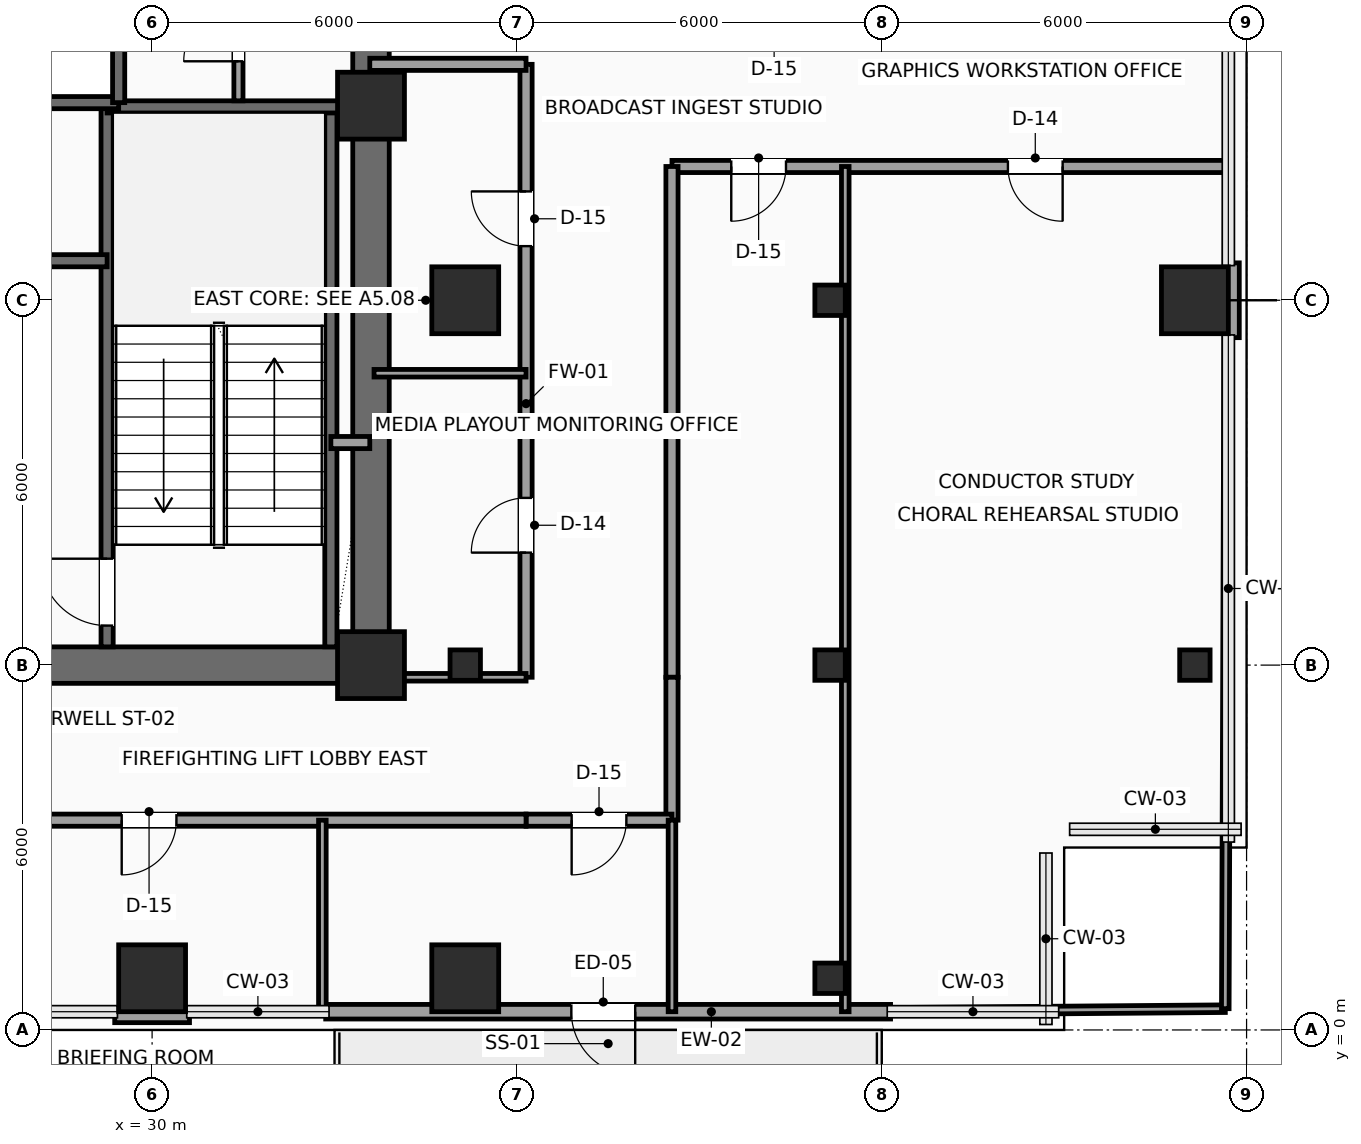
"""IFC4 building model, lengths in metres.
Left out: names, types, materials, properties, quantities, classifications, styles, units other than length and angle.
Written with IfcOpenShell. Run it as: python <this file> out.ifc"""

import sys

from ifc_helpers import new_model, si_unit, direction, frame, frame_2d, origin, origin_2d, place, context, subcontext, project, spatial, rectangle, hollow_rectangle, extrude, element, fill, save


model = new_model("IFC4")
c1 = context("Model", 3, precision=1e-05, world=origin(), true_north=direction((0.0, 1.0)))
c2 = subcontext(c1, "Body", "Model", "MODEL_VIEW")
j1 = project(units=[si_unit("LENGTHUNIT", "METRE"), si_unit("PLANEANGLEUNIT", "RADIAN")], contexts=[c1])
p1 = place(None, origin())
s1 = spatial("IfcSite", under=j1, at=p1, CompositionType="ELEMENT")
p2 = place(p1, origin())
s2 = spatial("IfcBuilding", under=s1, at=p2, CompositionType="ELEMENT")
p3 = place(p2, frame((0.0, 0.0, 153.15)))
s3 = spatial("IfcBuildingStorey", under=s2, at=p3, CompositionType="ELEMENT", Elevation=153.15)
for number, where, z_axis, x_axis in (
    (1, (33.6, 6.0, 0.0), (0.0, 0.0, 1.0), (1.0, 0.0, 0.0)),
    (2, (33.6, 15.2, 0.0), (0.0, 0.0, 1.0), (1.0, 0.0, 0.0)),
    (3, (30.0, 0.85, 0.0), (0.0, 0.0, 1.0), (1.0, 0.0, 0.0)),
    (4, (35.15, 0.85, 0.0), (0.0, 0.0, 1.0), (1.0, 0.0, 0.0)),
):
    element("IfcColumn", number, at=place(p3, frame(where, z_axis=z_axis, x_axis=x_axis)), inside=s3, PredefinedType="COLUMN", context=c2, shape_type="SweptSolid", body=[
        extrude(rectangle(XDim=1.1, YDim=1.1, at=origin_2d()), origin(), (0.0, 0.0, 1.0), 3.75),
    ])
p4 = place(p3, frame((35.15, 6.0, 0.0), z_axis=(0.0, 0.0, 1.0), x_axis=(1.0, 0.0, 0.0)))
e5 = element("IfcColumn", 5, at=p4, inside=s3, PredefinedType="COLUMN", context=c2, shape_type="SweptSolid", body=[
    extrude(hollow_rectangle(XDim=0.5, YDim=0.5, WallThickness=0.025, InnerFilletRadius=0.025, OuterFilletRadius=0.04, at=origin_2d()), origin(), (0.0, 0.0, 1.0), 3.75),
])
p5 = place(p3, frame((35.15, 12.0, 0.0), z_axis=(0.0, 0.0, 1.0), x_axis=(1.0, 0.0, 0.0)))
e6 = element("IfcColumn", 6, at=p5, inside=s3, PredefinedType="COLUMN", context=c2, shape_type="SweptSolid", body=[
    extrude(rectangle(XDim=1.1, YDim=1.1, at=origin_2d()), origin(), (0.0, 0.0, 1.0), 3.75),
])
for number, where, z_axis, x_axis in (
    (7, (41.15, 0.85, 0.0), (0.0, 0.0, 1.0), (1.0, 0.0, 0.0)),
    (8, (41.15, 6.0, 0.0), (0.0, 0.0, 1.0), (1.0, 0.0, 0.0)),
    (9, (41.15, 12.0, 0.0), (0.0, 0.0, 1.0), (1.0, 0.0, 0.0)),
    (10, (47.15, 6.0, 0.0), (0.0, 0.0, 1.0), (1.0, 0.0, 0.0)),
):
    element("IfcColumn", number, at=place(p3, frame(where, z_axis=z_axis, x_axis=x_axis)), inside=s3, PredefinedType="COLUMN", context=c2, shape_type="SweptSolid", body=[
        extrude(hollow_rectangle(XDim=0.5, YDim=0.5, WallThickness=0.025, InnerFilletRadius=0.025, OuterFilletRadius=0.04, at=origin_2d()), origin(), (0.0, 0.0, 1.0), 3.75),
    ])
p6 = place(p3, frame((47.15, 12.0, 0.0), z_axis=(0.0, 0.0, 1.0), x_axis=(1.0, 0.0, 0.0)))
e11 = element("IfcColumn", 11, at=p6, inside=s3, PredefinedType="COLUMN", context=c2, shape_type="SweptSolid", body=[
    extrude(rectangle(XDim=1.1, YDim=1.1, at=origin_2d()), origin(), (0.0, 0.0, 1.0), 3.75),
])
p7 = place(p3, frame((42.145, 0.3, 0.0), z_axis=(0.0, 0.0, 1.0), x_axis=(-1.0, 0.0, 0.0)))
e12 = element("IfcWall", 12, at=p7, inside=s3, PredefinedType="SOLIDWALL", context=c2, shape_type="SweptSolid", body=[
    extrude(rectangle(XDim=9.29, YDim=0.24, at=frame_2d((4.645, 0.0))), origin(), (0.0, 0.0, 1.0), 3.525),
])
p8 = place(p7, frame((4.2, 0.0, 0.0)))
e13 = element("IfcOpeningElement", 13, at=p8, cuts=e12, PredefinedType="OPENING", context=c2, shape_type="SweptSolid", body=[
    extrude(rectangle(XDim=1.05, YDim=2.2, at=frame_2d((0.525, 1.1))), frame((0.0, 0.13, 0.0), z_axis=(0.0, -1.0, 0.0), x_axis=(1.0, 0.0, 0.0)), (0.0, 0.0, 1.0), 0.26),
])
for number, where, z_axis, x_axis in (
    (14, (47.76, 12.615, 0.0), (0.0, 0.0, 1.0), (0.0, -1.0, 0.0)),
    (15, (30.615, 0.24, 0.0), (0.0, 0.0, 1.0), (-1.0, 0.0, 0.0)),
):
    element("IfcWall", number, at=place(p3, frame(where, z_axis=z_axis, x_axis=x_axis)), inside=s3, PredefinedType="SOLIDWALL", context=c2, shape_type="SweptSolid", body=[
        extrude(rectangle(XDim=1.23, YDim=0.24, at=frame_2d((0.615, 0.0))), origin(), (0.0, 0.0, 1.0), 3.525),
    ])
p9 = place(p3, frame((24.0, 6.0, 0.0), z_axis=(0.0, 0.0, 1.0), x_axis=(1.0, 0.0, 0.0)))
e16 = element("IfcWall", 16, at=p9, inside=s3, PredefinedType="SHEAR", context=c2, shape_type="SweptSolid", body=[
    extrude(rectangle(XDim=9.6, YDim=0.6, at=frame_2d((4.8, 0.0))), origin(), (0.0, 0.0, 1.0), 3.525),
])
p10 = place(p3, frame((33.6, 6.0, 0.0), z_axis=(0.0, 0.0, 1.0), x_axis=(0.0, 1.0, 0.0)))
e17 = element("IfcWall", 17, at=p10, inside=s3, PredefinedType="SHEAR", context=c2, shape_type="SweptSolid", body=[
    extrude(rectangle(XDim=12.0, YDim=0.6, at=frame_2d((6.0, 0.0))), origin(), (0.0, 0.0, 1.0), 3.525),
])
p11 = place(p10, frame((10.15, 0.0, 0.0)))
e18 = element("IfcOpeningElement", 18, at=p11, cuts=e17, PredefinedType="OPENING", context=c2, shape_type="SweptSolid", body=[
    extrude(rectangle(XDim=0.9, YDim=2.15, at=frame_2d((0.45, 1.075))), frame((0.0, 0.31, 0.0), z_axis=(0.0, -1.0, 0.0), x_axis=(1.0, 0.0, 0.0)), (0.0, 0.0, 1.0), 0.62),
])
p12 = place(p3, frame((29.26, 6.3, 0.0), z_axis=(0.0, 0.0, 1.0), x_axis=(0.0, 1.0, 0.0)))
e19 = element("IfcWall", 19, at=p12, inside=s3, PredefinedType="SHEAR", context=c2, shape_type="SweptSolid", body=[
    extrude(rectangle(XDim=8.88, YDim=0.2, at=frame_2d((4.44, 0.0))), origin(), (0.0, 0.0, 1.0), 3.525),
])
p13 = place(p12, frame((0.35, 0.0, 0.0)))
e20 = element("IfcOpeningElement", 20, at=p13, cuts=e19, PredefinedType="OPENING", context=c2, shape_type="SweptSolid", body=[
    extrude(rectangle(XDim=1.1, YDim=2.2, at=frame_2d((0.55, 1.1))), frame((0.0, 0.11, 0.0), z_axis=(0.0, -1.0, 0.0), x_axis=(1.0, 0.0, 0.0)), (0.0, 0.0, 1.0), 0.22),
])
p14 = place(p3, frame((32.94, 6.3, 0.0), z_axis=(0.0, 0.0, 1.0), x_axis=(0.0, 1.0, 0.0)))
e21 = element("IfcWall", 21, at=p14, inside=s3, PredefinedType="SHEAR", context=c2, shape_type="SweptSolid", body=[
    extrude(rectangle(XDim=8.88, YDim=0.2, at=frame_2d((4.44, 0.0))), origin(), (0.0, 0.0, 1.0), 3.525),
])
p15 = place(p3, frame((29.26, 15.18, 0.0), z_axis=(0.0, 0.0, 1.0), x_axis=(1.0, 0.0, 0.0)))
e22 = element("IfcWall", 22, at=p15, inside=s3, PredefinedType="SHEAR", context=c2, shape_type="SweptSolid", body=[
    extrude(rectangle(XDim=4.04, YDim=0.2, at=frame_2d((2.02, 0.0))), origin(), (0.0, 0.0, 1.0), 3.525),
])
p16 = place(p3, frame((26.42, 12.65, 0.0), z_axis=(0.0, 0.0, 1.0), x_axis=(1.0, 0.0, 0.0)))
e23 = element("IfcWall", 23, at=p16, inside=s3, PredefinedType="SHEAR", context=c2, shape_type="SweptSolid", body=[
    extrude(rectangle(XDim=2.84, YDim=0.2, at=frame_2d((1.42, 0.0))), origin(), (0.0, 0.0, 1.0), 3.525),
])
p17 = place(p16, frame((0.9, 0.0, 0.0)))
e24 = element("IfcOpeningElement", 24, at=p17, cuts=e23, PredefinedType="OPENING", context=c2, shape_type="SweptSolid", body=[
    extrude(rectangle(XDim=0.9, YDim=2.15, at=frame_2d((0.45, 1.075))), frame((0.0, 0.11, 0.0), z_axis=(0.0, -1.0, 0.0), x_axis=(1.0, 0.0, 0.0)), (0.0, 0.0, 1.0), 0.22),
])
p18 = place(p3, frame((32.94, 9.66, 0.0), z_axis=(0.0, 0.0, 1.0), x_axis=(1.0, 0.0, 0.0)))
e25 = element("IfcWall", 25, at=p18, inside=s3, PredefinedType="SOLIDWALL", context=c2, shape_type="SweptSolid", body=[
    extrude(rectangle(XDim=0.64, YDim=0.2, at=frame_2d((0.32, 0.0))), origin(), (0.0, 0.0, 1.0), 3.525),
])
p19 = place(p3, frame((24.25, 15.25, 0.0), z_axis=(0.0, 0.0, 1.0), x_axis=(1.0, 0.0, 0.0)))
e26 = element("IfcWall", 26, at=p19, inside=s3, PredefinedType="SHEAR", context=c2, shape_type="SweptSolid", body=[
    extrude(rectangle(XDim=5.2, YDim=0.2, at=frame_2d((2.6, 0.0))), origin(), (0.0, 0.0, 1.0), 3.525),
])
p20 = place(p3, frame((29.45, 15.25, 0.0), z_axis=(0.0, 0.0, 1.0), x_axis=(0.0, 1.0, 0.0)))
e27 = element("IfcWall", 27, at=p20, inside=s3, PredefinedType="SHEAR", context=c2, shape_type="SweptSolid", body=[
    extrude(rectangle(XDim=2.45, YDim=0.2, at=frame_2d((1.225, 0.0))), origin(), (0.0, 0.0, 1.0), 3.525),
])
p21 = place(p3, frame((31.42, 15.28, 0.0), z_axis=(0.0, 0.0, 1.0), x_axis=(0.0, 1.0, 0.0)))
e28 = element("IfcWall", 28, at=p21, inside=s3, PredefinedType="PARTITIONING", context=c2, shape_type="SweptSolid", body=[
    extrude(rectangle(XDim=2.42, YDim=0.15, at=frame_2d((1.21, 0.0))), origin(), (0.0, 0.0, 1.0), 3.525),
])
p22 = place(p21, frame((0.65, 0.0, 0.0)))
e29 = element("IfcOpeningElement", 29, at=p22, cuts=e28, PredefinedType="OPENING", context=c2, shape_type="SweptSolid", body=[
    extrude(rectangle(XDim=0.9, YDim=2.15, at=frame_2d((0.45, 1.075))), frame((0.0, 0.085, 0.0), z_axis=(0.0, -1.0, 0.0), x_axis=(1.0, 0.0, 0.0)), (0.0, 0.0, 1.0), 0.17),
])
p23 = place(p3, frame((36.15, 5.8, 0.0), z_axis=(0.0, 0.0, 1.0), x_axis=(0.0, 1.0, 0.0)))
e30 = element("IfcWall", 30, at=p23, inside=s3, PredefinedType="SOLIDWALL", context=c2, shape_type="SweptSolid", body=[
    extrude(rectangle(XDim=10.08, YDim=0.2, at=frame_2d((5.04, 0.0))), origin(), (0.0, 0.0, 1.0), 3.525),
])
p24 = place(p23, frame((2.05, 0.0, 0.0)))
e31 = element("IfcOpeningElement", 31, at=p24, cuts=e30, PredefinedType="OPENING", context=c2, shape_type="SweptSolid", body=[
    extrude(rectangle(XDim=0.9, YDim=2.1, at=frame_2d((0.45, 1.05))), frame((0.0, 0.11, 0.0), z_axis=(0.0, -1.0, 0.0), x_axis=(1.0, 0.0, 0.0)), (0.0, 0.0, 1.0), 0.22),
])
p25 = place(p23, frame((7.09, 0.0, 0.0)))
e32 = element("IfcOpeningElement", 32, at=p25, cuts=e30, PredefinedType="OPENING", context=c2, shape_type="SweptSolid", body=[
    extrude(rectangle(XDim=0.9, YDim=2.1, at=frame_2d((0.45, 1.05))), frame((0.0, 0.11, 0.0), z_axis=(0.0, -1.0, 0.0), x_axis=(1.0, 0.0, 0.0)), (0.0, 0.0, 1.0), 0.22),
])
p26 = place(p3, frame((36.15, 15.88, 0.0), z_axis=(0.0, 0.0, 1.0), x_axis=(-1.0, 0.0, 0.0)))
e33 = element("IfcWall", 33, at=p26, inside=s3, PredefinedType="SOLIDWALL", context=c2, shape_type="SweptSolid", body=[
    extrude(rectangle(XDim=2.57, YDim=0.2, at=frame_2d((1.285, 0.0))), origin(), (0.0, 0.0, 1.0), 3.525),
])
p27 = place(p3, frame((47.7, 14.2, 0.0), z_axis=(0.0, 0.0, 1.0), x_axis=(-1.0, 0.0, 0.0)))
e34 = element("IfcWall", 34, at=p27, inside=s3, PredefinedType="SOLIDWALL", context=c2, shape_type="SweptSolid", body=[
    extrude(rectangle(XDim=9.15, YDim=0.2, at=frame_2d((4.575, 0.0))), origin(), (0.0, 0.0, 1.0), 3.525),
])
p28 = place(p27, frame((7.275, 0.0, 0.0)))
e35 = element("IfcOpeningElement", 35, at=p28, cuts=e34, PredefinedType="OPENING", context=c2, shape_type="SweptSolid", body=[
    extrude(rectangle(XDim=0.9, YDim=2.1, at=frame_2d((0.45, 1.05))), frame((0.0, 0.11, 0.0), z_axis=(0.0, -1.0, 0.0), x_axis=(1.0, 0.0, 0.0)), (0.0, 0.0, 1.0), 0.22),
])
p29 = place(p27, frame((2.725, 0.0, 0.0)))
e36 = element("IfcOpeningElement", 36, at=p29, cuts=e34, PredefinedType="OPENING", context=c2, shape_type="SweptSolid", body=[
    extrude(rectangle(XDim=0.9, YDim=2.1, at=frame_2d((0.45, 1.05))), frame((0.0, 0.11, 0.0), z_axis=(0.0, -1.0, 0.0), x_axis=(1.0, 0.0, 0.0)), (0.0, 0.0, 1.0), 0.22),
])
p30 = place(p3, frame((38.55, 14.2, 0.0), z_axis=(0.0, 0.0, 1.0), x_axis=(0.0, -1.0, 0.0)))
e37 = element("IfcWall", 37, at=p30, inside=s3, PredefinedType="SOLIDWALL", context=c2, shape_type="SweptSolid", body=[
    extrude(rectangle(XDim=8.4, YDim=0.2, at=frame_2d((4.2, 0.0))), origin(), (0.0, 0.0, 1.0), 3.525),
])
p31 = place(p3, frame((38.55, 5.8, 0.0), z_axis=(0.0, 0.0, 1.0), x_axis=(0.0, -1.0, 0.0)))
e38 = element("IfcWall", 38, at=p31, inside=s3, PredefinedType="SOLIDWALL", context=c2, shape_type="SweptSolid", body=[
    extrude(rectangle(XDim=2.35, YDim=0.2, at=frame_2d((1.175, 0.0))), origin(), (0.0, 0.0, 1.0), 3.525),
])
p32 = place(p3, frame((38.55, 3.45, 0.0), z_axis=(0.0, 0.0, 1.0), x_axis=(-1.0, 0.0, 0.0)))
e39 = element("IfcWall", 39, at=p32, inside=s3, PredefinedType="SOLIDWALL", context=c2, shape_type="SweptSolid", body=[
    extrude(rectangle(XDim=2.4, YDim=0.2, at=frame_2d((1.2, 0.0))), origin(), (0.0, 0.0, 1.0), 3.067),
])
p33 = place(p32, frame((0.75, 0.0, 0.0)))
e40 = element("IfcOpeningElement", 40, at=p33, cuts=e39, PredefinedType="OPENING", context=c2, shape_type="SweptSolid", body=[
    extrude(rectangle(XDim=0.9, YDim=2.1, at=frame_2d((0.45, 1.05))), frame((0.0, 0.11, 0.0), z_axis=(0.0, -1.0, 0.0), x_axis=(1.0, 0.0, 0.0)), (0.0, 0.0, 1.0), 0.22),
])
p34 = place(p3, frame((36.15, 3.45, 0.0), z_axis=(0.0, 0.0, 1.0), x_axis=(-1.0, 0.0, 0.0)))
e41 = element("IfcWall", 41, at=p34, inside=s3, PredefinedType="SOLIDWALL", context=c2, shape_type="SweptSolid", body=[
    extrude(rectangle(XDim=12.2, YDim=0.2, at=frame_2d((6.1, 0.0))), origin(), (0.0, 0.0, 1.0), 3.067),
])
p35 = place(p34, frame((10.175, 0.0, 0.0)))
e42 = element("IfcOpeningElement", 42, at=p35, cuts=e41, PredefinedType="OPENING", context=c2, shape_type="SweptSolid", body=[
    extrude(rectangle(XDim=0.9, YDim=2.1, at=frame_2d((0.45, 1.05))), frame((0.0, 0.11, 0.0), z_axis=(0.0, -1.0, 0.0), x_axis=(1.0, 0.0, 0.0)), (0.0, 0.0, 1.0), 0.22),
])
p36 = place(p34, frame((5.75, 0.0, 0.0)))
e43 = element("IfcOpeningElement", 43, at=p36, cuts=e41, PredefinedType="OPENING", context=c2, shape_type="SweptSolid", body=[
    extrude(rectangle(XDim=0.9, YDim=2.1, at=frame_2d((0.45, 1.05))), frame((0.0, 0.11, 0.0), z_axis=(0.0, -1.0, 0.0), x_axis=(1.0, 0.0, 0.0)), (0.0, 0.0, 1.0), 0.22),
])
for number, where, z_axis, x_axis in (
    (44, (32.8, 0.3, 0.0), (0.0, 0.0, 1.0), (0.0, 1.0, 0.0)),
    (45, (38.55, 0.3, 0.0), (0.0, 0.0, 1.0), (0.0, 1.0, 0.0)),
):
    element("IfcWall", number, at=place(p3, frame(where, z_axis=z_axis, x_axis=x_axis)), inside=s3, PredefinedType="PARTITIONING", context=c2, shape_type="SweptSolid", body=[
        extrude(rectangle(XDim=3.15, YDim=0.125, at=frame_2d((1.575, 0.0))), origin(), (0.0, 0.0, 1.0), 3.525),
    ])
p37 = place(p3, frame((33.65, 5.8, 0.0), z_axis=(0.0, 0.0, 1.0), x_axis=(1.0, 0.0, 0.0)))
e46 = element("IfcWall", 46, at=p37, inside=s3, PredefinedType="PARTITIONING", context=c2, shape_type="SweptSolid", body=[
    extrude(rectangle(XDim=2.5, YDim=0.125, at=frame_2d((1.25, 0.0))), origin(), (0.0, 0.0, 1.0), 3.017),
])
p38 = place(p3, frame((33.65, 10.8, 0.0), z_axis=(0.0, 0.0, 1.0), x_axis=(1.0, 0.0, 0.0)))
e47 = element("IfcWall", 47, at=p38, inside=s3, PredefinedType="PARTITIONING", context=c2, shape_type="SweptSolid", body=[
    extrude(rectangle(XDim=2.5, YDim=0.125, at=frame_2d((1.25, 0.0))), origin(), (0.0, 0.0, 1.0), 3.525),
])
p39 = place(p3, frame((41.4, 0.3, 0.0), z_axis=(0.0, 0.0, 1.0), x_axis=(0.0, 1.0, 0.0)))
e48 = element("IfcWall", 48, at=p39, inside=s3, PredefinedType="PARTITIONING", context=c2, shape_type="SweptSolid", body=[
    extrude(rectangle(XDim=13.9, YDim=0.125, at=frame_2d((6.95, 0.0))), origin(), (0.0, 0.0, 1.0), 3.017),
])
p40 = place(p3, frame((42.145, 0.306, 0.0), z_axis=(0.0, 0.0, 1.0), x_axis=(0.999967782628, 0.008027060877, 0.0)))
e49 = element("IfcWall", 49, at=p40, inside=s3, PredefinedType="PARTITIONING", context=c2, shape_type="SweptSolid", body=[
    extrude(rectangle(XDim=5.505, YDim=0.125, at=frame_2d((2.752, 0.0))), origin(), (0.0, 0.0, 1.0), 3.525),
])
p41 = place(p3, frame((47.65, 0.35, 0.0), z_axis=(0.0, 0.0, 1.0), x_axis=(0.003606251025, 0.999993497456, 0.0)))
e50 = element("IfcWall", 50, at=p41, inside=s3, PredefinedType="PARTITIONING", context=c2, shape_type="SweptSolid", body=[
    extrude(rectangle(XDim=11.035, YDim=0.125, at=frame_2d((5.518, 0.0))), origin(), (0.0, 0.0, 1.0), 3.525),
])
p42 = place(p3, frame((47.694, 12.615, 0.0), z_axis=(0.0, 0.0, 1.0), x_axis=(0.003542799701, 0.999993724265, 0.0)))
e51 = element("IfcWall", 51, at=p42, inside=s3, PredefinedType="PARTITIONING", context=c2, shape_type="SweptSolid", body=[
    extrude(rectangle(XDim=1.585, YDim=0.125, at=frame_2d((0.792, 0.0))), origin(), (0.0, 0.0, 1.0), 3.525),
])
p43 = place(p8, origin())
e52 = element("IfcDoor", 52, at=p43, inside=s3, OperationType="SINGLE_SWING_LEFT", PredefinedType="DOOR", context=c2, shape_type="SweptSolid", body=[
    extrude(rectangle(XDim=1.05, YDim=2.2, at=frame_2d((0.525, 1.1))), frame((0.0, 0.025, 0.0), z_axis=(0.0, -1.0, 0.0), x_axis=(1.0, 0.0, 0.0)), (0.0, 0.0, 1.0), 0.05),
])
fill(e13, e52)
p44 = place(p13, origin())
e53 = element("IfcDoor", 53, at=p44, inside=s3, OperationType="SINGLE_SWING_RIGHT", PredefinedType="DOOR", context=c2, shape_type="SweptSolid", body=[
    extrude(rectangle(XDim=1.1, YDim=2.2, at=frame_2d((0.55, 1.1))), frame((0.0, 0.025, 0.0), z_axis=(0.0, -1.0, 0.0), x_axis=(1.0, 0.0, 0.0)), (0.0, 0.0, 1.0), 0.05),
])
fill(e20, e53)
p45 = place(p22, origin())
e54 = element("IfcDoor", 54, at=p45, inside=s3, OperationType="SINGLE_SWING_LEFT", PredefinedType="DOOR", context=c2, shape_type="SweptSolid", body=[
    extrude(rectangle(XDim=0.9, YDim=2.15, at=frame_2d((0.45, 1.075))), frame((0.0, 0.025, 0.0), z_axis=(0.0, -1.0, 0.0), x_axis=(1.0, 0.0, 0.0)), (0.0, 0.0, 1.0), 0.05),
])
fill(e29, e54)
p46 = place(p24, origin())
e55 = element("IfcDoor", 55, at=p46, inside=s3, OperationType="SINGLE_SWING_LEFT", PredefinedType="DOOR", context=c2, shape_type="SweptSolid", body=[
    extrude(rectangle(XDim=0.9, YDim=2.1, at=frame_2d((0.45, 1.05))), frame((0.0, 0.025, 0.0), z_axis=(0.0, -1.0, 0.0), x_axis=(1.0, 0.0, 0.0)), (0.0, 0.0, 1.0), 0.05),
])
fill(e31, e55)
p47 = place(p25, origin())
e56 = element("IfcDoor", 56, at=p47, inside=s3, OperationType="SINGLE_SWING_RIGHT", PredefinedType="DOOR", context=c2, shape_type="SweptSolid", body=[
    extrude(rectangle(XDim=0.9, YDim=2.1, at=frame_2d((0.45, 1.05))), frame((0.0, 0.025, 0.0), z_axis=(0.0, -1.0, 0.0), x_axis=(1.0, 0.0, 0.0)), (0.0, 0.0, 1.0), 0.05),
])
fill(e32, e56)
p48 = place(p28, origin())
e57 = element("IfcDoor", 57, at=p48, inside=s3, OperationType="SINGLE_SWING_RIGHT", PredefinedType="DOOR", context=c2, shape_type="SweptSolid", body=[
    extrude(rectangle(XDim=0.9, YDim=2.1, at=frame_2d((0.45, 1.05))), frame((0.0, 0.025, 0.0), z_axis=(0.0, -1.0, 0.0), x_axis=(1.0, 0.0, 0.0)), (0.0, 0.0, 1.0), 0.05),
])
fill(e35, e57)
p49 = place(p29, origin())
e58 = element("IfcDoor", 58, at=p49, inside=s3, OperationType="SINGLE_SWING_LEFT", PredefinedType="DOOR", context=c2, shape_type="SweptSolid", body=[
    extrude(rectangle(XDim=0.9, YDim=2.1, at=frame_2d((0.45, 1.05))), frame((0.0, 0.025, 0.0), z_axis=(0.0, -1.0, 0.0), x_axis=(1.0, 0.0, 0.0)), (0.0, 0.0, 1.0), 0.05),
])
fill(e36, e58)
p50 = place(p33, origin())
e59 = element("IfcDoor", 59, at=p50, inside=s3, OperationType="SINGLE_SWING_RIGHT", PredefinedType="DOOR", context=c2, shape_type="SweptSolid", body=[
    extrude(rectangle(XDim=0.9, YDim=2.1, at=frame_2d((0.45, 1.05))), frame((0.0, 0.025, 0.0), z_axis=(0.0, -1.0, 0.0), x_axis=(1.0, 0.0, 0.0)), (0.0, 0.0, 1.0), 0.05),
])
fill(e40, e59)
p51 = place(p36, origin())
e60 = element("IfcDoor", 60, at=p51, inside=s3, OperationType="SINGLE_SWING_RIGHT", PredefinedType="DOOR", context=c2, shape_type="SweptSolid", body=[
    extrude(rectangle(XDim=0.9, YDim=2.1, at=frame_2d((0.45, 1.05))), frame((0.0, 0.025, 0.0), z_axis=(0.0, -1.0, 0.0), x_axis=(1.0, 0.0, 0.0)), (0.0, 0.0, 1.0), 0.05),
])
fill(e43, e60)
save(model, sys.argv[1])
